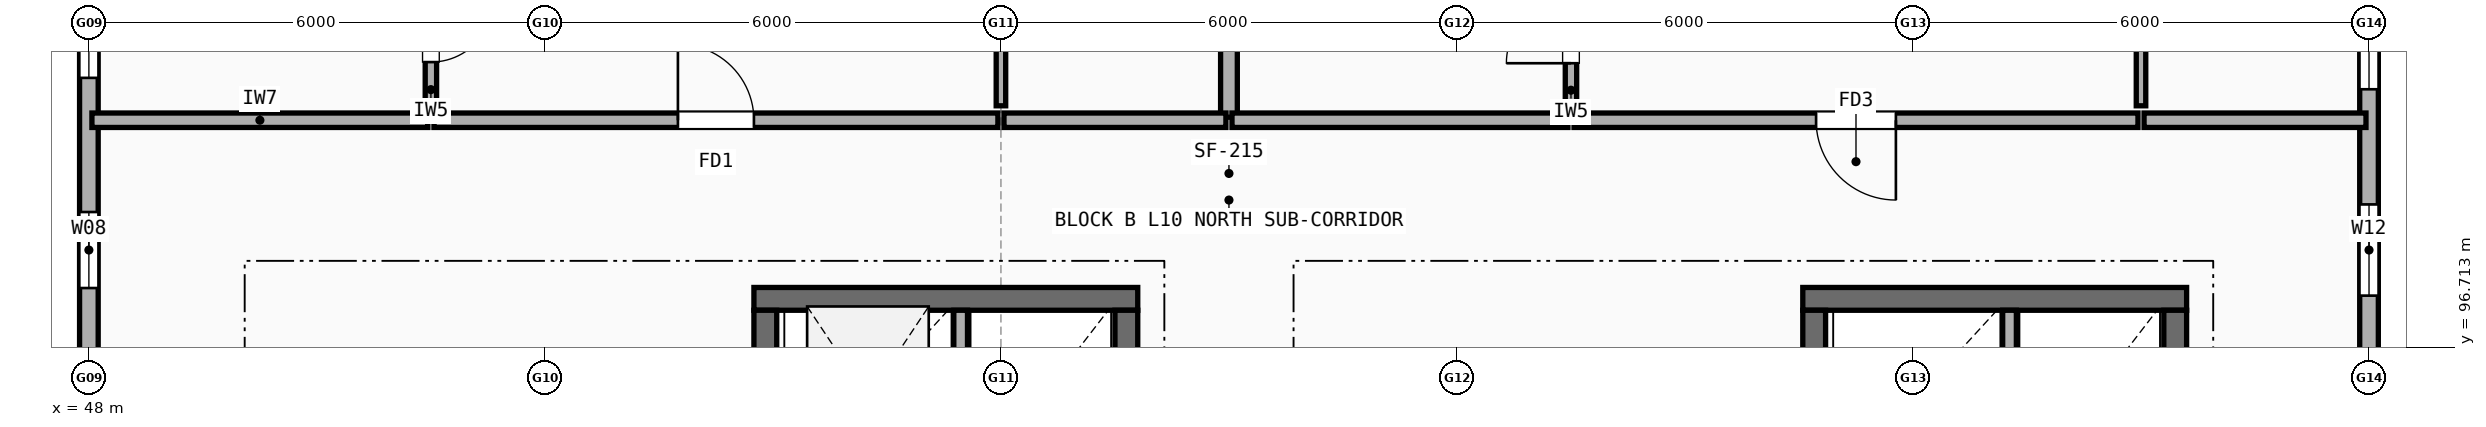
"""IFC4 building model, lengths in metres.
Left out: names, types, materials, properties, quantities, classifications, styles, units other than length and angle.
Written with IfcOpenShell. Run it as: python <this file> out.ifc"""

import sys

from ifc_helpers import new_model, si_unit, direction, frame, frame_2d, origin, place, context, subcontext, project, spatial, rectangle, extrude, element, fill, save


model = new_model("IFC4")
c1 = context("Model", 3, precision=1e-05, world=origin(), true_north=direction((0.0, 1.0)))
c2 = subcontext(c1, "Body", "Model", "MODEL_VIEW")
j1 = project(units=[si_unit("LENGTHUNIT", "METRE"), si_unit("PLANEANGLEUNIT", "RADIAN")], contexts=[c1])
p1 = place(None, origin())
s1 = spatial("IfcSite", under=j1, at=p1, CompositionType="ELEMENT")
p2 = place(p1, origin())
s2 = spatial("IfcBuilding", under=s1, at=p2, CompositionType="ELEMENT")
p3 = place(p2, frame((0.0, 0.0, 33.3)))
s3 = spatial("IfcBuildingStorey", under=s2, at=p3, CompositionType="ELEMENT", Elevation=33.3)
p4 = place(p3, frame((78.0, 96.325, 0.0), z_axis=(0.0, 0.0, 1.0), x_axis=(0.0, 1.0, 0.0)))
e1 = element("IfcWall", 1, at=p4, inside=s3, PredefinedType="STANDARD", context=c2, shape_type="SweptSolid", body=[
    extrude(rectangle(XDim=5.35, YDim=0.245, at=frame_2d((2.675, 0.0))), origin(), (0.0, 0.0, 1.0), 2.472),
])
p5 = place(p4, frame((1.067, 0.0, 0.9)))
e2 = element("IfcOpeningElement", 2, at=p5, cuts=e1, PredefinedType="OPENING", context=c2, shape_type="SweptSolid", body=[
    extrude(rectangle(XDim=1.2, YDim=1.35, at=frame_2d((0.6, 0.675))), frame((0.0, 0.133, 0.0), z_axis=(0.0, -1.0, 0.0), x_axis=(1.0, 0.0, 0.0)), (0.0, 0.0, 1.0), 0.265),
])
p6 = place(p4, frame((3.782, 0.0, 0.9)))
e3 = element("IfcOpeningElement", 3, at=p6, cuts=e1, PredefinedType="OPENING", context=c2, shape_type="SweptSolid", body=[
    extrude(rectangle(XDim=1.2, YDim=1.35, at=frame_2d((0.6, 0.675))), frame((0.0, 0.133, 0.0), z_axis=(0.0, -1.0, 0.0), x_axis=(1.0, 0.0, 0.0)), (0.0, 0.0, 1.0), 0.265),
])
p7 = place(p3, frame((48.0, 101.675, 0.0), z_axis=(0.0, 0.0, 1.0), x_axis=(0.0, -1.0, 0.0)))
e4 = element("IfcWall", 4, at=p7, inside=s3, PredefinedType="STANDARD", context=c2, shape_type="SweptSolid", body=[
    extrude(rectangle(XDim=5.35, YDim=0.245, at=frame_2d((2.675, 0.0))), origin(), (0.0, 0.0, 1.0), 2.472),
])
p8 = place(p7, frame((0.518, 0.0, 0.9)))
e5 = element("IfcOpeningElement", 5, at=p8, cuts=e4, PredefinedType="OPENING", context=c2, shape_type="SweptSolid", body=[
    extrude(rectangle(XDim=0.9, YDim=1.4, at=frame_2d((0.45, 0.7))), frame((0.0, 0.133, 0.0), z_axis=(0.0, -1.0, 0.0), x_axis=(1.0, 0.0, 0.0)), (0.0, 0.0, 1.0), 0.265),
])
p9 = place(p7, frame((3.183, 0.0, 0.9)))
e6 = element("IfcOpeningElement", 6, at=p9, cuts=e4, PredefinedType="OPENING", context=c2, shape_type="SweptSolid", body=[
    extrude(rectangle(XDim=1.0, YDim=1.4, at=frame_2d((0.5, 0.7))), frame((0.0, 0.133, 0.0), z_axis=(0.0, -1.0, 0.0), x_axis=(1.0, 0.0, 0.0)), (0.0, 0.0, 1.0), 0.265),
])
p10 = place(p3, frame((61.8, 97.35, 0.0), z_axis=(0.0, 0.0, 1.0), x_axis=(-1.0, 0.0, 0.0)))
e7 = element("IfcWall", 7, at=p10, inside=s3, PredefinedType="SHEAR", context=c2, shape_type="SweptSolid", body=[
    extrude(rectangle(XDim=5.05, YDim=0.3, at=frame_2d((2.525, 0.0))), origin(), (0.0, 0.0, 1.0), 2.99),
])
p11 = place(p3, frame((61.65, 90.75, 0.0), z_axis=(0.0, 0.0, 1.0), x_axis=(0.0, 1.0, 0.0)))
e8 = element("IfcWall", 8, at=p11, inside=s3, PredefinedType="SHEAR", context=c2, shape_type="SweptSolid", body=[
    extrude(rectangle(XDim=6.45, YDim=0.3, at=frame_2d((3.225, 0.0))), origin(), (0.0, 0.0, 1.0), 2.99),
])
p12 = place(p3, frame((56.9, 93.75, 0.0), z_axis=(0.0, 0.0, 1.0), x_axis=(0.0, 1.0, 0.0)))
e9 = element("IfcWall", 9, at=p12, inside=s3, PredefinedType="SHEAR", context=c2, shape_type="SweptSolid", body=[
    extrude(rectangle(XDim=3.45, YDim=0.3, at=frame_2d((1.725, 0.0))), origin(), (0.0, 0.0, 1.0), 2.99),
])
p13 = place(p3, frame((59.47, 94.94, 0.0), z_axis=(0.0, 0.0, 1.0), x_axis=(0.0, 1.0, 0.0)))
e10 = element("IfcWall", 10, at=p13, inside=s3, PredefinedType="SOLIDWALL", context=c2, shape_type="SweptSolid", body=[
    extrude(rectangle(XDim=2.26, YDim=0.18, at=frame_2d((1.13, 0.0))), origin(), (0.0, 0.0, 1.0), 2.99),
])
p14 = place(p3, frame((75.6, 97.35, 0.0), z_axis=(0.0, 0.0, 1.0), x_axis=(-1.0, 0.0, 0.0)))
e11 = element("IfcWall", 11, at=p14, inside=s3, PredefinedType="SHEAR", context=c2, shape_type="SweptSolid", body=[
    extrude(rectangle(XDim=5.05, YDim=0.3, at=frame_2d((2.525, 0.0))), origin(), (0.0, 0.0, 1.0), 2.99),
])
p15 = place(p3, frame((75.45, 90.75, 0.0), z_axis=(0.0, 0.0, 1.0), x_axis=(0.0, 1.0, 0.0)))
e12 = element("IfcWall", 12, at=p15, inside=s3, PredefinedType="SHEAR", context=c2, shape_type="SweptSolid", body=[
    extrude(rectangle(XDim=6.45, YDim=0.3, at=frame_2d((3.225, 0.0))), origin(), (0.0, 0.0, 1.0), 2.99),
])
p16 = place(p3, frame((70.7, 93.65, 0.0), z_axis=(0.0, 0.0, 1.0), x_axis=(0.0, 1.0, 0.0)))
e13 = element("IfcWall", 13, at=p16, inside=s3, PredefinedType="SHEAR", context=c2, shape_type="SweptSolid", body=[
    extrude(rectangle(XDim=3.55, YDim=0.3, at=frame_2d((1.775, 0.0))), origin(), (0.0, 0.0, 1.0), 2.99),
])
p17 = place(p3, frame((73.27, 94.94, 0.0), z_axis=(0.0, 0.0, 1.0), x_axis=(0.0, 1.0, 0.0)))
e14 = element("IfcWall", 14, at=p17, inside=s3, PredefinedType="SOLIDWALL", context=c2, shape_type="SweptSolid", body=[
    extrude(rectangle(XDim=2.26, YDim=0.18, at=frame_2d((1.13, 0.0))), origin(), (0.0, 0.0, 1.0), 2.99),
])
p18 = place(p3, frame((63.0, 99.74, 0.0), z_axis=(0.0, 0.0, 1.0), x_axis=(0.0, 1.0, 0.0)))
e15 = element("IfcWall", 15, at=p18, inside=s3, PredefinedType="SOLIDWALL", context=c2, shape_type="SweptSolid", body=[
    extrude(rectangle(XDim=13.87, YDim=0.22, at=frame_2d((6.935, 0.0))), origin(), (0.0, 0.0, 1.0), 2.472),
])
p19 = place(p3, frame((48.04, 99.7, 0.0), z_axis=(0.0, 0.0, 1.0), x_axis=(1.0, 0.0, 0.0)))
e16 = element("IfcWall", 16, at=p19, inside=s3, PredefinedType="SOLIDWALL", context=c2, shape_type="SweptSolid", body=[
    extrude(rectangle(XDim=4.42, YDim=0.19, at=frame_2d((2.21, 0.0))), origin(), (0.0, 0.0, 1.0), 2.472),
])
p20 = place(p3, frame((52.54, 99.7, 0.0), z_axis=(0.0, 0.0, 1.0), x_axis=(1.0, 0.0, 0.0)))
e17 = element("IfcWall", 17, at=p20, inside=s3, PredefinedType="SOLIDWALL", context=c2, shape_type="SweptSolid", body=[
    extrude(rectangle(XDim=7.42, YDim=0.19, at=frame_2d((3.71, 0.0))), origin(), (0.0, 0.0, 1.0), 2.508),
])
p21 = place(p20, frame((3.21, 0.0, 0.0)))
e18 = element("IfcOpeningElement", 18, at=p21, cuts=e17, PredefinedType="OPENING", context=c2, shape_type="SweptSolid", body=[
    extrude(rectangle(XDim=1.0, YDim=2.15, at=frame_2d((0.5, 1.075))), frame((0.0, 0.105, 0.0), z_axis=(0.0, -1.0, 0.0), x_axis=(1.0, 0.0, 0.0)), (0.0, 0.0, 1.0), 0.21),
])
p22 = place(p3, frame((52.5, 99.89, 0.0), z_axis=(0.0, 0.0, 1.0), x_axis=(0.0, 1.0, 0.0)))
e19 = element("IfcWall", 19, at=p22, inside=s3, PredefinedType="PARTITIONING", context=c2, shape_type="SweptSolid", body=[
    extrude(rectangle(XDim=1.97, YDim=0.15, at=frame_2d((0.985, 0.0))), origin(), (0.0, 0.0, 1.0), 2.99),
])
p23 = place(p22, frame((0.575, 0.0, 0.0)))
e20 = element("IfcOpeningElement", 20, at=p23, cuts=e19, PredefinedType="OPENING", context=c2, shape_type="SweptSolid", body=[
    extrude(rectangle(XDim=0.82, YDim=2.08, at=frame_2d((0.41, 1.04))), frame((0.0, 0.085, 0.0), z_axis=(0.0, -1.0, 0.0), x_axis=(1.0, 0.0, 0.0)), (0.0, 0.0, 1.0), 0.17),
])
p24 = place(p3, frame((60.04, 99.7, 0.0), z_axis=(0.0, 0.0, 1.0), x_axis=(1.0, 0.0, 0.0)))
e21 = element("IfcWall", 21, at=p24, inside=s3, PredefinedType="SOLIDWALL", context=c2, shape_type="SweptSolid", body=[
    extrude(rectangle(XDim=2.92, YDim=0.19, at=frame_2d((1.46, 0.0))), origin(), (0.0, 0.0, 1.0), 2.508),
])
p25 = place(p3, frame((60.0, 99.89, 0.0), z_axis=(0.0, 0.0, 1.0), x_axis=(0.0, 1.0, 0.0)))
e22 = element("IfcWall", 22, at=p25, inside=s3, PredefinedType="PARTITIONING", context=c2, shape_type="SweptSolid", body=[
    extrude(rectangle(XDim=13.6, YDim=0.125, at=frame_2d((6.8, 0.0))), origin(), (0.0, 0.0, 1.0), 2.508),
])
p26 = place(p25, frame((6.65, 0.0, 0.0)))
e23 = element("IfcOpeningElement", 23, at=p26, cuts=e22, PredefinedType="OPENING", context=c2, shape_type="SweptSolid", body=[
    extrude(rectangle(XDim=0.88, YDim=2.1, at=frame_2d((0.44, 1.05))), frame((0.0, 0.073, 0.0), z_axis=(0.0, -1.0, 0.0), x_axis=(1.0, 0.0, 0.0)), (0.0, 0.0, 1.0), 0.145),
])
p27 = place(p3, frame((63.04, 99.7, 0.0), z_axis=(0.0, 0.0, 1.0), x_axis=(1.0, 0.0, 0.0)))
e24 = element("IfcWall", 24, at=p27, inside=s3, PredefinedType="SOLIDWALL", context=c2, shape_type="SweptSolid", body=[
    extrude(rectangle(XDim=4.42, YDim=0.19, at=frame_2d((2.21, 0.0))), origin(), (0.0, 0.0, 1.0), 2.99),
])
p28 = place(p3, frame((67.54, 99.7, 0.0), z_axis=(0.0, 0.0, 1.0), x_axis=(1.0, 0.0, 0.0)))
e25 = element("IfcWall", 25, at=p28, inside=s3, PredefinedType="SOLIDWALL", context=c2, shape_type="SweptSolid", body=[
    extrude(rectangle(XDim=7.42, YDim=0.19, at=frame_2d((3.71, 0.0))), origin(), (0.0, 0.0, 1.0), 2.99),
])
p29 = place(p28, frame((3.185, 0.0, 0.0)))
e26 = element("IfcOpeningElement", 26, at=p29, cuts=e25, PredefinedType="OPENING", context=c2, shape_type="SweptSolid", body=[
    extrude(rectangle(XDim=1.05, YDim=2.15, at=frame_2d((0.525, 1.075))), frame((0.0, 0.105, 0.0), z_axis=(0.0, -1.0, 0.0), x_axis=(1.0, 0.0, 0.0)), (0.0, 0.0, 1.0), 0.21),
])
p30 = place(p3, frame((67.5, 99.89, 0.0), z_axis=(0.0, 0.0, 1.0), x_axis=(0.0, 1.0, 0.0)))
e27 = element("IfcWall", 27, at=p30, inside=s3, PredefinedType="PARTITIONING", context=c2, shape_type="SweptSolid", body=[
    extrude(rectangle(XDim=1.97, YDim=0.15, at=frame_2d((0.985, 0.0))), origin(), (0.0, 0.0, 1.0), 2.99),
])
p31 = place(p30, frame((0.56, 0.0, 0.0)))
e28 = element("IfcOpeningElement", 28, at=p31, cuts=e27, PredefinedType="OPENING", context=c2, shape_type="SweptSolid", body=[
    extrude(rectangle(XDim=0.85, YDim=2.1, at=frame_2d((0.425, 1.05))), frame((0.0, 0.085, 0.0), z_axis=(0.0, -1.0, 0.0), x_axis=(1.0, 0.0, 0.0)), (0.0, 0.0, 1.0), 0.17),
])
p32 = place(p3, frame((75.04, 99.7, 0.0), z_axis=(0.0, 0.0, 1.0), x_axis=(1.0, 0.0, 0.0)))
e29 = element("IfcWall", 29, at=p32, inside=s3, PredefinedType="SOLIDWALL", context=c2, shape_type="SweptSolid", body=[
    extrude(rectangle(XDim=2.92, YDim=0.19, at=frame_2d((1.46, 0.0))), origin(), (0.0, 0.0, 1.0), 2.472),
])
p33 = place(p3, frame((75.0, 99.89, 0.0), z_axis=(0.0, 0.0, 1.0), x_axis=(0.0, 1.0, 0.0)))
e30 = element("IfcWall", 30, at=p33, inside=s3, PredefinedType="PARTITIONING", context=c2, shape_type="SweptSolid", body=[
    extrude(rectangle(XDim=13.92, YDim=0.125, at=frame_2d((6.96, 0.0))), origin(), (0.0, 0.0, 1.0), 2.472),
])
p34 = place(p33, frame((6.65, 0.0, 0.0)))
e31 = element("IfcOpeningElement", 31, at=p34, cuts=e30, PredefinedType="OPENING", context=c2, shape_type="SweptSolid", body=[
    extrude(rectangle(XDim=0.9, YDim=2.1, at=frame_2d((0.45, 1.05))), frame((0.0, 0.073, 0.0), z_axis=(0.0, -1.0, 0.0), x_axis=(1.0, 0.0, 0.0)), (0.0, 0.0, 1.0), 0.145),
])
p35 = place(p5, origin())
e32 = element("IfcWindow", 32, at=p35, inside=s3, PartitioningType="SINGLE_PANEL", PredefinedType="WINDOW", context=c2, shape_type="SweptSolid", body=[
    extrude(rectangle(XDim=1.2, YDim=1.35, at=frame_2d((0.6, 0.675))), frame((0.0, 0.03, 0.0), z_axis=(0.0, -1.0, 0.0), x_axis=(1.0, 0.0, 0.0)), (0.0, 0.0, 1.0), 0.06),
])
fill(e2, e32)
p36 = place(p6, origin())
e33 = element("IfcWindow", 33, at=p36, inside=s3, PartitioningType="SINGLE_PANEL", PredefinedType="WINDOW", context=c2, shape_type="SweptSolid", body=[
    extrude(rectangle(XDim=1.2, YDim=1.35, at=frame_2d((0.6, 0.675))), frame((0.0, 0.03, 0.0), z_axis=(0.0, -1.0, 0.0), x_axis=(1.0, 0.0, 0.0)), (0.0, 0.0, 1.0), 0.06),
])
fill(e3, e33)
p37 = place(p8, origin())
e34 = element("IfcWindow", 34, at=p37, inside=s3, PartitioningType="SINGLE_PANEL", PredefinedType="WINDOW", context=c2, shape_type="SweptSolid", body=[
    extrude(rectangle(XDim=0.9, YDim=1.4, at=frame_2d((0.45, 0.7))), frame((0.0, 0.03, 0.0), z_axis=(0.0, -1.0, 0.0), x_axis=(1.0, 0.0, 0.0)), (0.0, 0.0, 1.0), 0.06),
])
fill(e5, e34)
p38 = place(p9, origin())
e35 = element("IfcWindow", 35, at=p38, inside=s3, PartitioningType="SINGLE_PANEL", PredefinedType="WINDOW", context=c2, shape_type="SweptSolid", body=[
    extrude(rectangle(XDim=1.0, YDim=1.4, at=frame_2d((0.5, 0.7))), frame((0.0, 0.03, 0.0), z_axis=(0.0, -1.0, 0.0), x_axis=(1.0, 0.0, 0.0)), (0.0, 0.0, 1.0), 0.06),
])
fill(e6, e35)
p39 = place(p21, origin())
e36 = element("IfcDoor", 36, at=p39, inside=s3, OperationType="SINGLE_SWING_LEFT", PredefinedType="DOOR", context=c2, shape_type="SweptSolid", body=[
    extrude(rectangle(XDim=1.0, YDim=2.15, at=frame_2d((0.5, 1.075))), frame((0.0, 0.025, 0.0), z_axis=(0.0, -1.0, 0.0), x_axis=(1.0, 0.0, 0.0)), (0.0, 0.0, 1.0), 0.05),
])
fill(e18, e36)
p40 = place(p23, origin())
e37 = element("IfcDoor", 37, at=p40, inside=s3, OperationType="SINGLE_SWING_RIGHT", PredefinedType="DOOR", context=c2, shape_type="SweptSolid", body=[
    extrude(rectangle(XDim=0.82, YDim=2.08, at=frame_2d((0.41, 1.04))), frame((0.0, 0.025, 0.0), z_axis=(0.0, -1.0, 0.0), x_axis=(1.0, 0.0, 0.0)), (0.0, 0.0, 1.0), 0.05),
])
fill(e20, e37)
p41 = place(p29, origin())
e38 = element("IfcDoor", 38, at=p41, inside=s3, OperationType="SINGLE_SWING_RIGHT", PredefinedType="DOOR", context=c2, shape_type="SweptSolid", body=[
    extrude(rectangle(XDim=1.05, YDim=2.15, at=frame_2d((0.525, 1.075))), frame((0.0, 0.025, 0.0), z_axis=(0.0, -1.0, 0.0), x_axis=(1.0, 0.0, 0.0)), (0.0, 0.0, 1.0), 0.05),
])
fill(e26, e38)
p42 = place(p31, origin())
e39 = element("IfcDoor", 39, at=p42, inside=s3, OperationType="SINGLE_SWING_LEFT", PredefinedType="DOOR", context=c2, shape_type="SweptSolid", body=[
    extrude(rectangle(XDim=0.85, YDim=2.1, at=frame_2d((0.425, 1.05))), frame((0.0, 0.025, 0.0), z_axis=(0.0, -1.0, 0.0), x_axis=(1.0, 0.0, 0.0)), (0.0, 0.0, 1.0), 0.05),
])
fill(e28, e39)
save(model, sys.argv[1])
